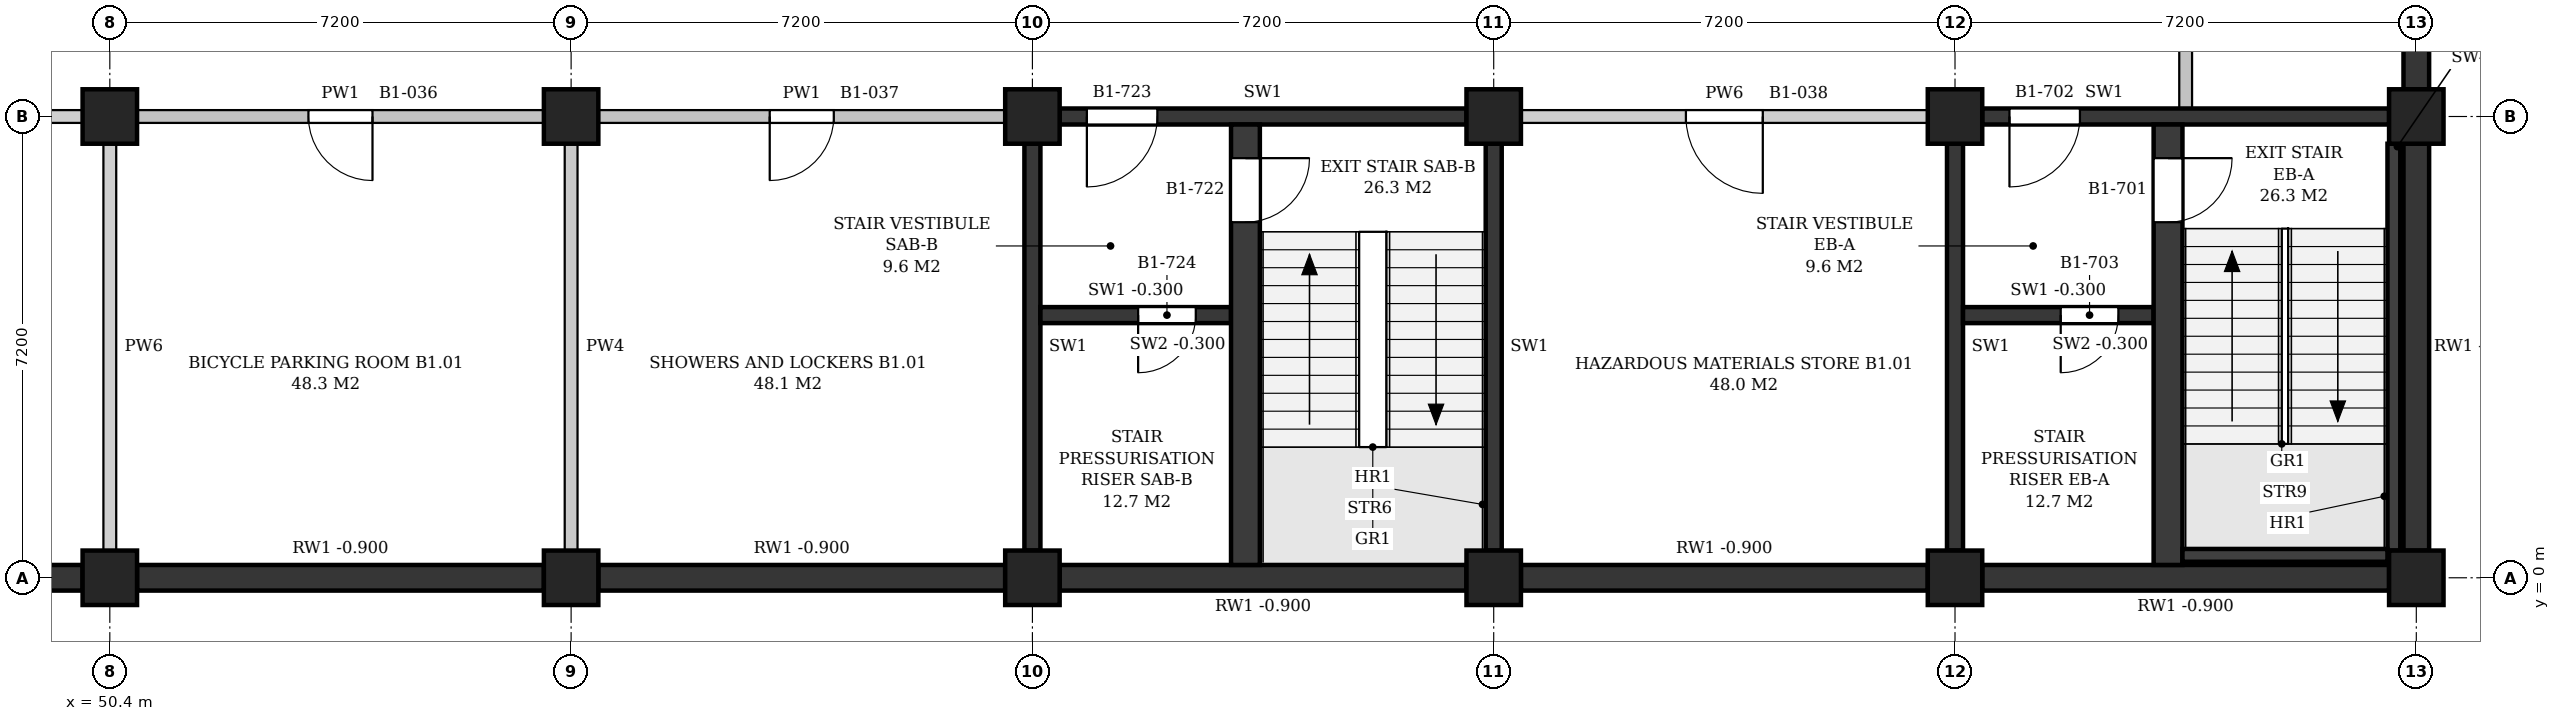
"""IFC4 building model, lengths in metres.
Left out: names, types, materials, properties, quantities, classifications, styles, units other than length and angle.
Written with IfcOpenShell. Run it as: python <this file> out.ifc"""

import sys

from ifc_helpers import new_model, si_unit, direction, frame, frame_2d, origin, origin_2d, place, context, subcontext, project, spatial, polyline, rectangle, outline, extrude, element, fill, save


model = new_model("IFC4")
c1 = context("Model", 3, precision=1e-05, world=origin(), true_north=direction((0.0, 1.0)))
c2 = subcontext(c1, "Body", "Model", "MODEL_VIEW")
j1 = project(units=[si_unit("LENGTHUNIT", "METRE"), si_unit("PLANEANGLEUNIT", "RADIAN")], contexts=[c1])
p1 = place(None, origin())
s1 = spatial("IfcSite", under=j1, at=p1, CompositionType="ELEMENT")
p2 = place(p1, origin())
s2 = spatial("IfcBuilding", under=s1, at=p2, CompositionType="ELEMENT")
p3 = place(p2, frame((0.0, 0.0, -4.5)))
s3 = spatial("IfcBuildingStorey", under=s2, at=p3, CompositionType="ELEMENT", Elevation=-4.5)
for number, where, z_axis, x_axis in (
    (1, (50.4, 0.0, 0.0), (0.0, 0.0, 1.0), (1.0, 0.0, 0.0)),
    (2, (50.4, 7.2, 0.0), (0.0, 0.0, 1.0), (1.0, 0.0, 0.0)),
    (3, (57.6, 0.0, 0.0), (0.0, 0.0, 1.0), (1.0, 0.0, 0.0)),
    (4, (57.6, 7.2, 0.0), (0.0, 0.0, 1.0), (1.0, 0.0, 0.0)),
    (5, (64.8, 0.0, 0.0), (0.0, 0.0, 1.0), (1.0, 0.0, 0.0)),
    (6, (64.8, 7.2, 0.0), (0.0, 0.0, 1.0), (1.0, 0.0, 0.0)),
    (7, (72.0, 0.0, 0.0), (0.0, 0.0, 1.0), (1.0, 0.0, 0.0)),
    (8, (72.0, 7.2, 0.0), (0.0, 0.0, 1.0), (1.0, 0.0, 0.0)),
    (9, (79.2, 0.0, 0.0), (0.0, 0.0, 1.0), (1.0, 0.0, 0.0)),
    (10, (79.2, 7.2, 0.0), (0.0, 0.0, 1.0), (1.0, 0.0, 0.0)),
    (11, (86.4, 0.0, 0.0), (0.0, 0.0, 1.0), (1.0, 0.0, 0.0)),
    (12, (86.4, 7.2, 0.0), (0.0, 0.0, 1.0), (1.0, 0.0, 0.0)),
):
    element("IfcColumn", number, at=place(p3, frame(where, z_axis=z_axis, x_axis=x_axis)), inside=s3, PredefinedType="COLUMN", context=c2, shape_type="SweptSolid", body=[
        extrude(rectangle(XDim=0.85, YDim=0.85, at=origin_2d()), origin(), (0.0, 0.0, 1.0), 4.5),
    ])
for number, where, z_axis, x_axis in (
    (13, (43.625, 0.0, 0.0), (0.0, 0.0, 1.0), (1.0, 0.0, 0.0)),
    (14, (50.825, 0.0, 0.0), (0.0, 0.0, 1.0), (1.0, 0.0, 0.0)),
    (15, (58.025, 0.0, 0.0), (0.0, 0.0, 1.0), (1.0, 0.0, 0.0)),
):
    element("IfcWall", number, at=place(p3, frame(where, z_axis=z_axis, x_axis=x_axis)), inside=s3, PredefinedType="SOLIDWALL", context=c2, shape_type="SweptSolid", body=[
        extrude(rectangle(XDim=6.35, YDim=0.4, at=frame_2d((3.175, 0.0))), origin(), (0.0, 0.0, 1.0), 3.6),
    ])
for number, where, z_axis, x_axis in (
    (16, (65.225, 0.0, 0.0), (0.0, 0.0, 1.0), (1.0, 0.0, 0.0)),
    (17, (72.425, 0.0, 0.0), (0.0, 0.0, 1.0), (1.0, 0.0, 0.0)),
):
    element("IfcWall", number, at=place(p3, frame(where, z_axis=z_axis, x_axis=x_axis)), inside=s3, PredefinedType="SOLIDWALL", context=c2, shape_type="SweptSolid", body=[
        extrude(rectangle(XDim=6.35, YDim=0.4, at=frame_2d((3.175, 0.0))), origin(), (0.0, 0.0, 1.0), 3.6),
    ])
p4 = place(p3, frame((79.625, 0.0, 0.0), z_axis=(0.0, 0.0, 1.0), x_axis=(1.0, 0.0, 0.0)))
e18 = element("IfcWall", 18, at=p4, inside=s3, PredefinedType="SOLIDWALL", context=c2, shape_type="SweptSolid", body=[
    extrude(rectangle(XDim=6.35, YDim=0.4, at=frame_2d((3.175, 0.0))), origin(), (0.0, 0.0, 1.0), 3.6),
])
p5 = place(p3, frame((86.4, 0.425, 0.0), z_axis=(0.0, 0.0, 1.0), x_axis=(0.0, 1.0, 0.0)))
e19 = element("IfcWall", 19, at=p5, inside=s3, PredefinedType="SOLIDWALL", context=c2, shape_type="SweptSolid", body=[
    extrude(rectangle(XDim=6.35, YDim=0.4, at=frame_2d((3.175, 0.0))), origin(), (0.0, 0.0, 1.0), 3.6),
])
p6 = place(p3, frame((86.4, 7.625, 0.0), z_axis=(0.0, 0.0, 1.0), x_axis=(0.0, 1.0, 0.0)))
e20 = element("IfcWall", 20, at=p6, inside=s3, PredefinedType="SOLIDWALL", context=c2, shape_type="SweptSolid", body=[
    extrude(rectangle(XDim=6.35, YDim=0.4, at=frame_2d((3.175, 0.0))), origin(), (0.0, 0.0, 1.0), 3.6),
])
p7 = place(p3, frame((79.625, 7.2, 0.0), z_axis=(0.0, 0.0, 1.0), x_axis=(1.0, 0.0, 0.0)))
e21 = element("IfcWall", 21, at=p7, inside=s3, PredefinedType="SHEAR", context=c2, shape_type="SweptSolid", body=[
    extrude(rectangle(XDim=6.35, YDim=0.25, at=frame_2d((3.175, 0.0))), origin(), (0.0, 0.0, 1.0), 3.4),
])
p8 = place(p7, frame((0.425, 0.0, 0.0)))
e22 = element("IfcOpeningElement", 22, at=p8, cuts=e21, PredefinedType="OPENING", context=c2, shape_type="SweptSolid", body=[
    extrude(rectangle(XDim=1.1, YDim=2.1, at=frame_2d((0.55, 1.05))), frame((0.0, 0.135, 0.0), z_axis=(0.0, -1.0, 0.0), x_axis=(1.0, 0.0, 0.0)), (0.0, 0.0, 1.0), 0.27),
])
p9 = place(p3, frame((79.2, 0.425, 0.0), z_axis=(0.0, 0.0, 1.0), x_axis=(0.0, 1.0, 0.0)))
e23 = element("IfcWall", 23, at=p9, inside=s3, PredefinedType="SHEAR", context=c2, shape_type="SweptSolid", body=[
    extrude(rectangle(XDim=6.35, YDim=0.25, at=frame_2d((3.175, 0.0))), origin(), (0.0, 0.0, 1.0), 3.4),
])
p10 = place(p3, frame((86.05, 0.425, 0.0), z_axis=(0.0, 0.0, 1.0), x_axis=(0.0, 1.0, 0.0)))
e24 = element("IfcWall", 24, at=p10, inside=s3, PredefinedType="SHEAR", context=c2, shape_type="SweptSolid", body=[
    extrude(rectangle(XDim=6.35, YDim=0.2, at=frame_2d((3.175, 0.0))), origin(), (0.0, 0.0, 1.0), 4.2),
])
p11 = place(p3, frame((82.75, 0.35, 0.0), z_axis=(0.0, 0.0, 1.0), x_axis=(1.0, 0.0, 0.0)))
e25 = element("IfcWall", 25, at=p11, inside=s3, PredefinedType="SHEAR", context=c2, shape_type="SweptSolid", body=[
    extrude(rectangle(XDim=3.2, YDim=0.2, at=frame_2d((1.6, 0.0))), origin(), (0.0, 0.0, 1.0), 4.2),
])
p12 = place(p3, frame((82.525, 0.2, 0.0), z_axis=(0.0, 0.0, 1.0), x_axis=(0.0, 1.0, 0.0)))
e26 = element("IfcWall", 26, at=p12, inside=s3, PredefinedType="SHEAR", context=c2, shape_type="SweptSolid", body=[
    extrude(rectangle(XDim=6.875, YDim=0.45, at=frame_2d((3.438, 0.0))), origin(), (0.0, 0.0, 1.0), 4.2),
])
p13 = place(p12, frame((5.35, 0.0, 0.0)))
e27 = element("IfcOpeningElement", 27, at=p13, cuts=e26, PredefinedType="OPENING", context=c2, shape_type="SweptSolid", body=[
    extrude(rectangle(XDim=1.0, YDim=2.1, at=frame_2d((0.5, 1.05))), frame((0.0, 0.235, 0.0), z_axis=(0.0, -1.0, 0.0), x_axis=(1.0, 0.0, 0.0)), (0.0, 0.0, 1.0), 0.47),
])
p14 = place(p3, frame((79.325, 4.1, 0.0), z_axis=(0.0, 0.0, 1.0), x_axis=(1.0, 0.0, 0.0)))
e28 = element("IfcWall", 28, at=p14, inside=s3, PredefinedType="SHEAR", context=c2, shape_type="SweptSolid", body=[
    extrude(rectangle(XDim=2.975, YDim=0.25, at=frame_2d((1.488, 0.0))), origin(), (0.0, 0.0, 1.0), 4.2),
])
p15 = place(p14, frame((1.525, 0.0, 0.0)))
e29 = element("IfcOpeningElement", 29, at=p15, cuts=e28, PredefinedType="OPENING", context=c2, shape_type="SweptSolid", body=[
    extrude(rectangle(XDim=0.9, YDim=2.1, at=frame_2d((0.45, 1.05))), frame((0.0, 0.135, 0.0), z_axis=(0.0, -1.0, 0.0), x_axis=(1.0, 0.0, 0.0)), (0.0, 0.0, 1.0), 0.27),
])
p16 = place(p3, frame((65.225, 7.2, 0.0), z_axis=(0.0, 0.0, 1.0), x_axis=(1.0, 0.0, 0.0)))
e30 = element("IfcWall", 30, at=p16, inside=s3, PredefinedType="SHEAR", context=c2, shape_type="SweptSolid", body=[
    extrude(rectangle(XDim=6.35, YDim=0.25, at=frame_2d((3.175, 0.0))), origin(), (0.0, 0.0, 1.0), 3.4),
])
p17 = place(p16, frame((0.425, 0.0, 0.0)))
e31 = element("IfcOpeningElement", 31, at=p17, cuts=e30, PredefinedType="OPENING", context=c2, shape_type="SweptSolid", body=[
    extrude(rectangle(XDim=1.1, YDim=2.1, at=frame_2d((0.55, 1.05))), frame((0.0, 0.135, 0.0), z_axis=(0.0, -1.0, 0.0), x_axis=(1.0, 0.0, 0.0)), (0.0, 0.0, 1.0), 0.27),
])
for number, where, z_axis, x_axis in (
    (32, (72.0, 0.425, 0.0), (0.0, 0.0, 1.0), (0.0, 1.0, 0.0)),
    (33, (64.8, 0.425, 0.0), (0.0, 0.0, 1.0), (0.0, 1.0, 0.0)),
):
    element("IfcWall", number, at=place(p3, frame(where, z_axis=z_axis, x_axis=x_axis)), inside=s3, PredefinedType="SHEAR", context=c2, shape_type="SweptSolid", body=[
        extrude(rectangle(XDim=6.35, YDim=0.25, at=frame_2d((3.175, 0.0))), origin(), (0.0, 0.0, 1.0), 3.4),
    ])
p18 = place(p3, frame((68.125, 0.2, 0.0), z_axis=(0.0, 0.0, 1.0), x_axis=(0.0, 1.0, 0.0)))
e34 = element("IfcWall", 34, at=p18, inside=s3, PredefinedType="SHEAR", context=c2, shape_type="SweptSolid", body=[
    extrude(rectangle(XDim=6.875, YDim=0.45, at=frame_2d((3.438, 0.0))), origin(), (0.0, 0.0, 1.0), 4.2),
])
p19 = place(p18, frame((5.35, 0.0, 0.0)))
e35 = element("IfcOpeningElement", 35, at=p19, cuts=e34, PredefinedType="OPENING", context=c2, shape_type="SweptSolid", body=[
    extrude(rectangle(XDim=1.0, YDim=2.1, at=frame_2d((0.5, 1.05))), frame((0.0, 0.235, 0.0), z_axis=(0.0, -1.0, 0.0), x_axis=(1.0, 0.0, 0.0)), (0.0, 0.0, 1.0), 0.47),
])
p20 = place(p3, frame((64.925, 4.1, 0.0), z_axis=(0.0, 0.0, 1.0), x_axis=(1.0, 0.0, 0.0)))
e36 = element("IfcWall", 36, at=p20, inside=s3, PredefinedType="SHEAR", context=c2, shape_type="SweptSolid", body=[
    extrude(rectangle(XDim=2.975, YDim=0.25, at=frame_2d((1.487, 0.0))), origin(), (0.0, 0.0, 1.0), 4.2),
])
p21 = place(p20, frame((1.525, 0.0, 0.0)))
e37 = element("IfcOpeningElement", 37, at=p21, cuts=e36, PredefinedType="OPENING", context=c2, shape_type="SweptSolid", body=[
    extrude(rectangle(XDim=0.9, YDim=2.1, at=frame_2d((0.45, 1.05))), frame((0.0, 0.135, 0.0), z_axis=(0.0, -1.0, 0.0), x_axis=(1.0, 0.0, 0.0)), (0.0, 0.0, 1.0), 0.27),
])
p22 = place(p3, frame((43.625, 7.2, 0.0), z_axis=(0.0, 0.0, 1.0), x_axis=(1.0, 0.0, 0.0)))
e38 = element("IfcWall", 38, at=p22, inside=s3, PredefinedType="PARTITIONING", context=c2, shape_type="SweptSolid", body=[
    extrude(rectangle(XDim=6.35, YDim=0.2, at=frame_2d((3.175, 0.0))), origin(), (0.0, 0.0, 1.0), 3.4),
])
p23 = place(p22, frame((2.175, 0.0, 0.0)))
e39 = element("IfcOpeningElement", 39, at=p23, cuts=e38, PredefinedType="OPENING", context=c2, shape_type="SweptSolid", body=[
    extrude(rectangle(XDim=2.0, YDim=2.1, at=frame_2d((1.0, 1.05))), frame((0.0, 0.11, 0.0), z_axis=(0.0, -1.0, 0.0), x_axis=(1.0, 0.0, 0.0)), (0.0, 0.0, 1.0), 0.22),
])
p24 = place(p3, frame((50.825, 7.2, 0.0), z_axis=(0.0, 0.0, 1.0), x_axis=(1.0, 0.0, 0.0)))
e40 = element("IfcWall", 40, at=p24, inside=s3, PredefinedType="PARTITIONING", context=c2, shape_type="SweptSolid", body=[
    extrude(rectangle(XDim=6.35, YDim=0.2, at=frame_2d((3.175, 0.0))), origin(), (0.0, 0.0, 1.0), 3.4),
])
p25 = place(p24, frame((2.675, 0.0, 0.0)))
e41 = element("IfcOpeningElement", 41, at=p25, cuts=e40, PredefinedType="OPENING", context=c2, shape_type="SweptSolid", body=[
    extrude(rectangle(XDim=1.0, YDim=2.1, at=frame_2d((0.5, 1.05))), frame((0.0, 0.11, 0.0), z_axis=(0.0, -1.0, 0.0), x_axis=(1.0, 0.0, 0.0)), (0.0, 0.0, 1.0), 0.22),
])
p26 = place(p3, frame((58.025, 7.2, 0.0), z_axis=(0.0, 0.0, 1.0), x_axis=(1.0, 0.0, 0.0)))
e42 = element("IfcWall", 42, at=p26, inside=s3, PredefinedType="PARTITIONING", context=c2, shape_type="SweptSolid", body=[
    extrude(rectangle(XDim=6.35, YDim=0.2, at=frame_2d((3.175, 0.0))), origin(), (0.0, 0.0, 1.0), 3.4),
])
p27 = place(p26, frame((2.675, 0.0, 0.0)))
e43 = element("IfcOpeningElement", 43, at=p27, cuts=e42, PredefinedType="OPENING", context=c2, shape_type="SweptSolid", body=[
    extrude(rectangle(XDim=1.0, YDim=2.1, at=frame_2d((0.5, 1.05))), frame((0.0, 0.11, 0.0), z_axis=(0.0, -1.0, 0.0), x_axis=(1.0, 0.0, 0.0)), (0.0, 0.0, 1.0), 0.22),
])
p28 = place(p3, frame((72.425, 7.2, 0.0), z_axis=(0.0, 0.0, 1.0), x_axis=(1.0, 0.0, 0.0)))
e44 = element("IfcWall", 44, at=p28, inside=s3, PredefinedType="PARTITIONING", context=c2, shape_type="SweptSolid", body=[
    extrude(rectangle(XDim=6.35, YDim=0.2, at=frame_2d((3.175, 0.0))), origin(), (0.0, 0.0, 1.0), 3.4),
])
p29 = place(p28, frame((2.575, 0.0, 0.0)))
e45 = element("IfcOpeningElement", 45, at=p29, cuts=e44, PredefinedType="OPENING", context=c2, shape_type="SweptSolid", body=[
    extrude(rectangle(XDim=1.2, YDim=2.1, at=frame_2d((0.6, 1.05))), frame((0.0, 0.11, 0.0), z_axis=(0.0, -1.0, 0.0), x_axis=(1.0, 0.0, 0.0)), (0.0, 0.0, 1.0), 0.22),
])
for number, where, z_axis, x_axis in (
    (46, (50.4, 0.425, 0.0), (0.0, 0.0, 1.0), (0.0, 1.0, 0.0)),
    (47, (57.6, 0.425, 0.0), (0.0, 0.0, 1.0), (0.0, 1.0, 0.0)),
):
    element("IfcWall", number, at=place(p3, frame(where, z_axis=z_axis, x_axis=x_axis)), inside=s3, PredefinedType="PARTITIONING", context=c2, shape_type="SweptSolid", body=[
        extrude(rectangle(XDim=6.35, YDim=0.2, at=frame_2d((3.175, 0.0))), origin(), (0.0, 0.0, 1.0), 3.4),
    ])
p30 = place(p3, frame((82.8, 7.325, 0.0), z_axis=(0.0, 0.0, 1.0), x_axis=(0.0, 1.0, 0.0)))
e48 = element("IfcWall", 48, at=p30, inside=s3, PredefinedType="PARTITIONING", context=c2, shape_type="SweptSolid", body=[
    extrude(outline(polyline([(0.0, 0.0), (7.075, 0.0), (7.075, 3.4), (6.775, 3.4), (6.775, 4.2), (0.175, 4.2), (0.175, 3.4), (0.0, 3.4), (0.0, 0.0)])), frame((0.0, 0.1, 0.0), z_axis=(0.0, -1.0, 0.0), x_axis=(1.0, 0.0, 0.0)), (0.0, 0.0, 1.0), 0.2),
])
p31 = place(p30, frame((3.037, 0.0, 0.0)))
e49 = element("IfcOpeningElement", 49, at=p31, cuts=e48, PredefinedType="OPENING", context=c2, shape_type="SweptSolid", body=[
    extrude(rectangle(XDim=1.0, YDim=2.1, at=frame_2d((0.5, 1.05))), frame((0.0, 0.11, 0.0), z_axis=(0.0, -1.0, 0.0), x_axis=(1.0, 0.0, 0.0)), (0.0, 0.0, 1.0), 0.22),
])
p32 = place(p13, frame((1.0, 0.0, 0.0), z_axis=(0.0, 0.0, 1.0), x_axis=(-1.0, 0.0, 0.0)))
e50 = element("IfcDoor", 50, at=p32, inside=s3, OperationType="SINGLE_SWING_LEFT", PredefinedType="DOOR", context=c2, shape_type="SweptSolid", body=[
    extrude(rectangle(XDim=1.0, YDim=2.1, at=frame_2d((0.5, 1.05))), frame((0.0, 0.025, 0.0), z_axis=(0.0, -1.0, 0.0), x_axis=(1.0, 0.0, 0.0)), (0.0, 0.0, 1.0), 0.05),
])
fill(e27, e50)
p33 = place(p8, frame((1.1, 0.0, 0.0), z_axis=(0.0, 0.0, 1.0), x_axis=(-1.0, 0.0, 0.0)))
e51 = element("IfcDoor", 51, at=p33, inside=s3, OperationType="SINGLE_SWING_RIGHT", PredefinedType="DOOR", context=c2, shape_type="SweptSolid", body=[
    extrude(rectangle(XDim=1.1, YDim=2.1, at=frame_2d((0.55, 1.05))), frame((0.0, 0.025, 0.0), z_axis=(0.0, -1.0, 0.0), x_axis=(1.0, 0.0, 0.0)), (0.0, 0.0, 1.0), 0.05),
])
fill(e22, e51)
p34 = place(p15, frame((0.9, 0.0, 0.0), z_axis=(0.0, 0.0, 1.0), x_axis=(-1.0, 0.0, 0.0)))
e52 = element("IfcDoor", 52, at=p34, inside=s3, OperationType="SINGLE_SWING_RIGHT", PredefinedType="DOOR", context=c2, shape_type="SweptSolid", body=[
    extrude(rectangle(XDim=0.9, YDim=2.1, at=frame_2d((0.45, 1.05))), frame((0.0, 0.025, 0.0), z_axis=(0.0, -1.0, 0.0), x_axis=(1.0, 0.0, 0.0)), (0.0, 0.0, 1.0), 0.05),
])
fill(e29, e52)
p35 = place(p19, frame((1.0, 0.0, 0.0), z_axis=(0.0, 0.0, 1.0), x_axis=(-1.0, 0.0, 0.0)))
e53 = element("IfcDoor", 53, at=p35, inside=s3, OperationType="SINGLE_SWING_LEFT", PredefinedType="DOOR", context=c2, shape_type="SweptSolid", body=[
    extrude(rectangle(XDim=1.0, YDim=2.1, at=frame_2d((0.5, 1.05))), frame((0.0, 0.025, 0.0), z_axis=(0.0, -1.0, 0.0), x_axis=(1.0, 0.0, 0.0)), (0.0, 0.0, 1.0), 0.05),
])
fill(e35, e53)
p36 = place(p17, frame((1.1, 0.0, 0.0), z_axis=(0.0, 0.0, 1.0), x_axis=(-1.0, 0.0, 0.0)))
e54 = element("IfcDoor", 54, at=p36, inside=s3, OperationType="SINGLE_SWING_RIGHT", PredefinedType="DOOR", context=c2, shape_type="SweptSolid", body=[
    extrude(rectangle(XDim=1.1, YDim=2.1, at=frame_2d((0.55, 1.05))), frame((0.0, 0.025, 0.0), z_axis=(0.0, -1.0, 0.0), x_axis=(1.0, 0.0, 0.0)), (0.0, 0.0, 1.0), 0.05),
])
fill(e31, e54)
p37 = place(p21, frame((0.9, 0.0, 0.0), z_axis=(0.0, 0.0, 1.0), x_axis=(-1.0, 0.0, 0.0)))
e55 = element("IfcDoor", 55, at=p37, inside=s3, OperationType="SINGLE_SWING_RIGHT", PredefinedType="DOOR", context=c2, shape_type="SweptSolid", body=[
    extrude(rectangle(XDim=0.9, YDim=2.1, at=frame_2d((0.45, 1.05))), frame((0.0, 0.025, 0.0), z_axis=(0.0, -1.0, 0.0), x_axis=(1.0, 0.0, 0.0)), (0.0, 0.0, 1.0), 0.05),
])
fill(e37, e55)
p38 = place(p25, frame((1.0, 0.0, 0.0), z_axis=(0.0, 0.0, 1.0), x_axis=(-1.0, 0.0, 0.0)))
e56 = element("IfcDoor", 56, at=p38, inside=s3, OperationType="SINGLE_SWING_LEFT", PredefinedType="DOOR", context=c2, shape_type="SweptSolid", body=[
    extrude(rectangle(XDim=1.0, YDim=2.1, at=frame_2d((0.5, 1.05))), frame((0.0, 0.025, 0.0), z_axis=(0.0, -1.0, 0.0), x_axis=(1.0, 0.0, 0.0)), (0.0, 0.0, 1.0), 0.05),
])
fill(e41, e56)
p39 = place(p27, frame((1.0, 0.0, 0.0), z_axis=(0.0, 0.0, 1.0), x_axis=(-1.0, 0.0, 0.0)))
e57 = element("IfcDoor", 57, at=p39, inside=s3, OperationType="SINGLE_SWING_RIGHT", PredefinedType="DOOR", context=c2, shape_type="SweptSolid", body=[
    extrude(rectangle(XDim=1.0, YDim=2.1, at=frame_2d((0.5, 1.05))), frame((0.0, 0.025, 0.0), z_axis=(0.0, -1.0, 0.0), x_axis=(1.0, 0.0, 0.0)), (0.0, 0.0, 1.0), 0.05),
])
fill(e43, e57)
p40 = place(p29, frame((1.2, 0.0, 0.0), z_axis=(0.0, 0.0, 1.0), x_axis=(-1.0, 0.0, 0.0)))
e58 = element("IfcDoor", 58, at=p40, inside=s3, OperationType="SINGLE_SWING_LEFT", PredefinedType="DOOR", context=c2, shape_type="SweptSolid", body=[
    extrude(rectangle(XDim=1.2, YDim=2.1, at=frame_2d((0.6, 1.05))), frame((0.0, 0.025, 0.0), z_axis=(0.0, -1.0, 0.0), x_axis=(1.0, 0.0, 0.0)), (0.0, 0.0, 1.0), 0.05),
])
fill(e45, e58)
save(model, sys.argv[1])
